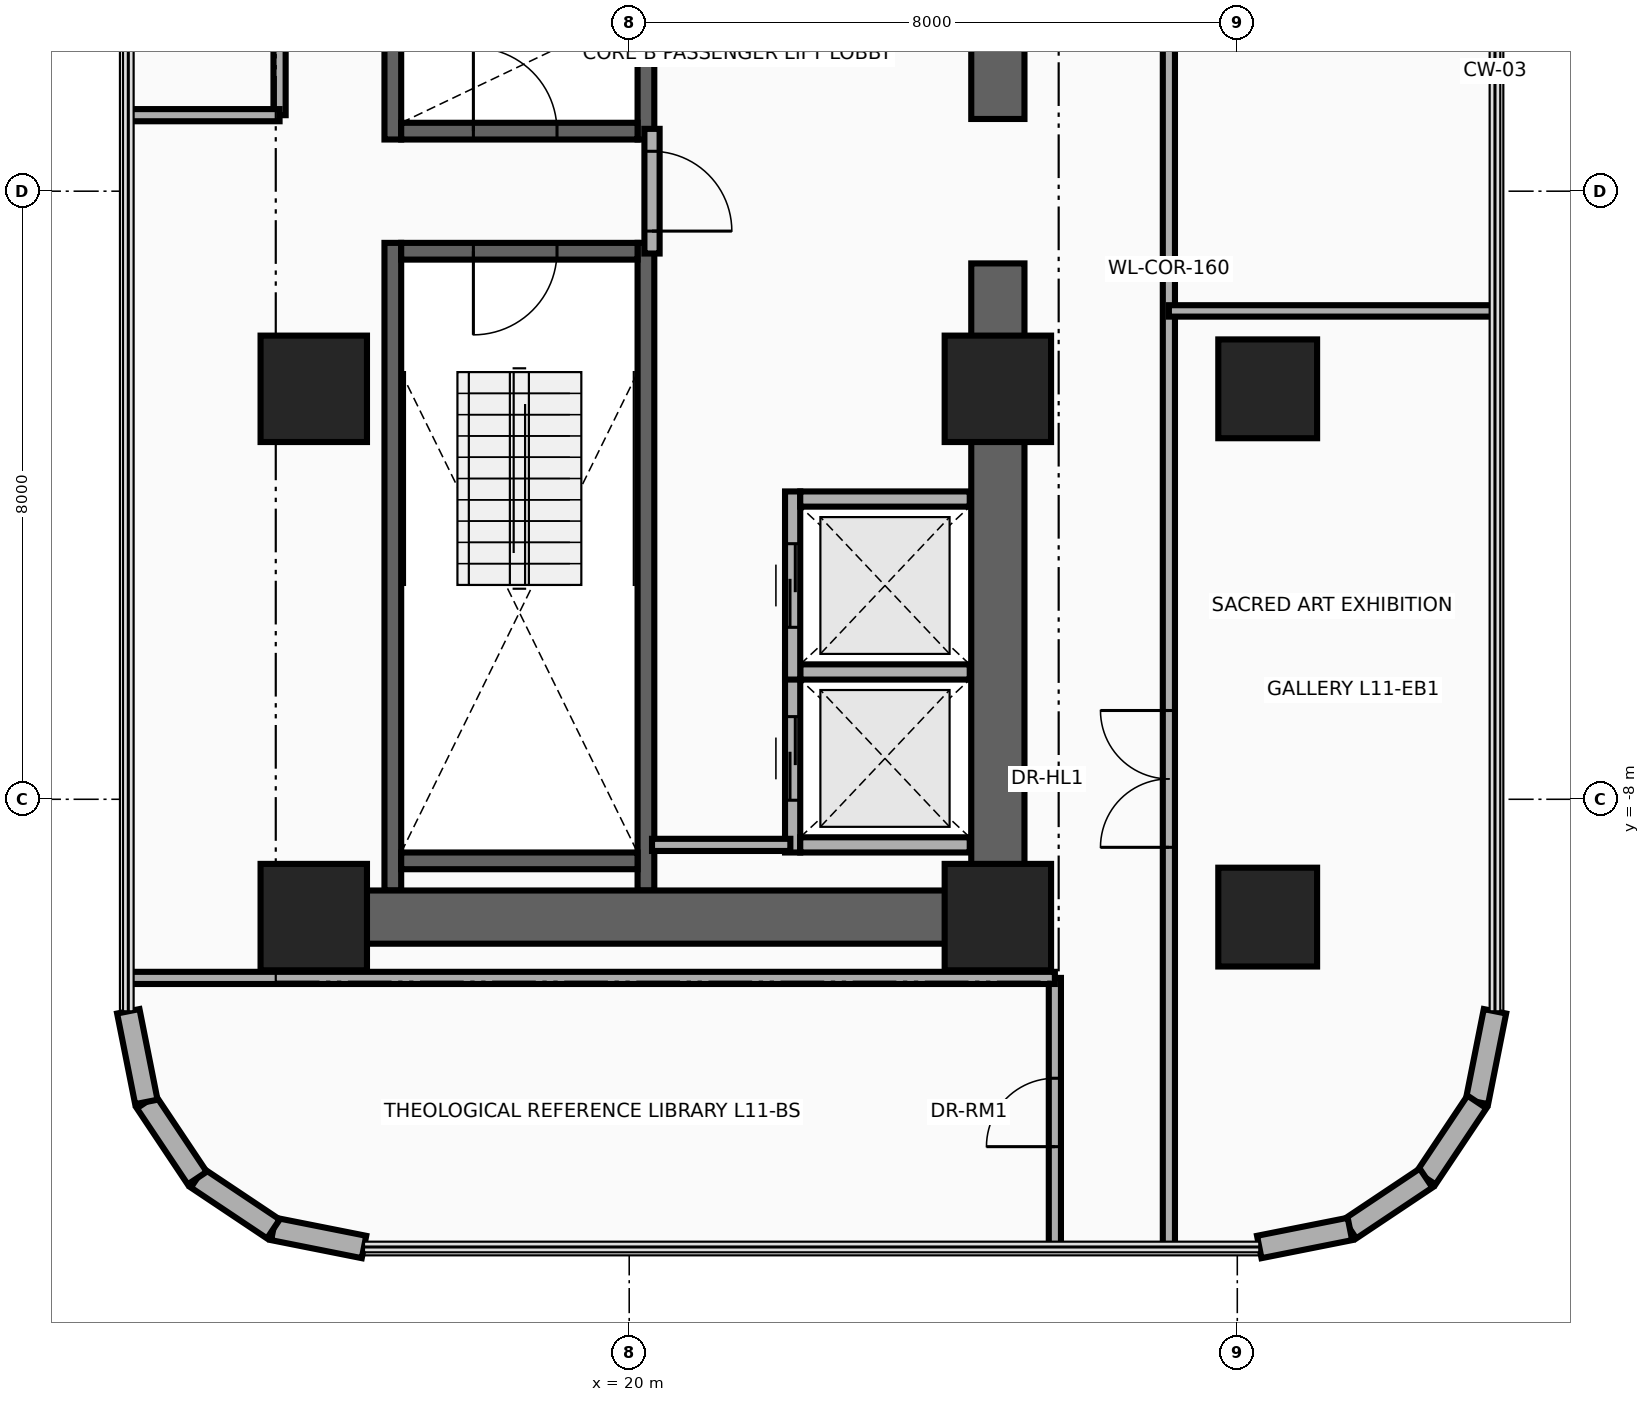
"""IFC4 building model, lengths in metres.
Left out: names, types, materials, properties, quantities, classifications, styles, units other than length and angle.
Written with IfcOpenShell. Run it as: python <this file> out.ifc"""

import sys

from ifc_helpers import new_model, si_unit, direction, frame, frame_2d, origin, origin_2d, place, context, subcontext, project, spatial, rectangle, circle, extrude, source, transform, mapped, element, fill, save


model = new_model("IFC4")
c1 = context("Model", 3, precision=1e-05, world=origin(), true_north=direction((0.0, 1.0)))
c2 = subcontext(c1, "Body", "Model", "MODEL_VIEW")
j1 = project(units=[si_unit("LENGTHUNIT", "METRE"), si_unit("PLANEANGLEUNIT", "RADIAN")], contexts=[c1])
p1 = place(None, origin())
s1 = spatial("IfcSite", under=j1, at=p1, CompositionType="ELEMENT")
p2 = place(p1, origin())
s2 = spatial("IfcBuilding", under=s1, at=p2, CompositionType="ELEMENT")
p3 = place(p2, frame((0.0, 0.0, 48.2)))
s3 = spatial("IfcBuildingStorey", under=s2, at=p3, CompositionType="ELEMENT", Elevation=48.2)
for number, where, z_axis, x_axis in (
    (1, (16.89, 0.68, 0.0), (0.0, 0.0, 1.0), (0.0, 1.0, 0.0)),
    (2, (20.22, 0.68, 0.0), (0.0, 0.0, 1.0), (0.0, 1.0, 0.0)),
):
    element("IfcWall", number, at=place(p3, frame(where, z_axis=z_axis, x_axis=x_axis)), inside=s3, PredefinedType="SHEAR", context=c2, shape_type="SweptSolid", body=[
        extrude(rectangle(XDim=8.52, YDim=0.22, at=frame_2d((4.26, 0.0))), origin(), (0.0, 0.0, 1.0), 3.46),
    ])
p4 = place(p3, frame((17.0, 0.79, 0.0), z_axis=(0.0, 0.0, 1.0), x_axis=(1.0, 0.0, 0.0)))
e3 = element("IfcWall", 3, at=p4, inside=s3, PredefinedType="SHEAR", context=c2, shape_type="SweptSolid", body=[
    extrude(rectangle(XDim=3.11, YDim=0.22, at=frame_2d((1.555, 0.0))), origin(), (0.0, 0.0, 1.0), 3.46),
])
p5 = place(p4, frame((0.95, 0.0, 0.0)))
e4 = element("IfcOpeningElement", 4, at=p5, cuts=e3, PredefinedType="OPENING", context=c2, shape_type="SweptSolid", body=[
    extrude(rectangle(XDim=1.1, YDim=2.15, at=frame_2d((0.55, 1.075))), frame((0.0, 0.125, 0.0), z_axis=(0.0, -1.0, 0.0), x_axis=(1.0, 0.0, 0.0)), (0.0, 0.0, 1.0), 0.25),
])
for number, where, z_axis, x_axis in (
    (5, (16.89, -9.2, 0.0), (0.0, 0.0, 1.0), (0.0, 1.0, 0.0)),
    (6, (20.22, -9.2, 0.0), (0.0, 0.0, 1.0), (0.0, 1.0, 0.0)),
):
    element("IfcWall", number, at=place(p3, frame(where, z_axis=z_axis, x_axis=x_axis)), inside=s3, PredefinedType="SHEAR", context=c2, shape_type="SweptSolid", body=[
        extrude(rectangle(XDim=8.52, YDim=0.22, at=frame_2d((4.26, 0.0))), origin(), (0.0, 0.0, 1.0), 3.46),
    ])
p6 = place(p3, frame((17.0, -8.81, 0.0), z_axis=(0.0, 0.0, 1.0), x_axis=(1.0, 0.0, 0.0)))
e7 = element("IfcWall", 7, at=p6, inside=s3, PredefinedType="SHEAR", context=c2, shape_type="SweptSolid", body=[
    extrude(rectangle(XDim=3.11, YDim=0.22, at=frame_2d((1.555, 0.0))), origin(), (0.0, 0.0, 1.0), 3.46),
])
p7 = place(p3, frame((17.0, -0.79, 0.0), z_axis=(0.0, 0.0, 1.0), x_axis=(1.0, 0.0, 0.0)))
e8 = element("IfcWall", 8, at=p7, inside=s3, PredefinedType="SHEAR", context=c2, shape_type="SweptSolid", body=[
    extrude(rectangle(XDim=3.11, YDim=0.22, at=frame_2d((1.555, 0.0))), origin(), (0.0, 0.0, 1.0), 3.46),
])
p8 = place(p7, frame((0.95, 0.0, 0.0)))
e9 = element("IfcOpeningElement", 9, at=p8, cuts=e8, PredefinedType="OPENING", context=c2, shape_type="SweptSolid", body=[
    extrude(rectangle(XDim=1.1, YDim=2.15, at=frame_2d((0.55, 1.075))), frame((0.0, 0.125, 0.0), z_axis=(0.0, -1.0, 0.0), x_axis=(1.0, 0.0, 0.0)), (0.0, 0.0, 1.0), 0.25),
])
for number, where, z_axis, x_axis in (
    (10, (24.85, -9.9, 0.0), (0.0, 0.0, 1.0), (0.0, 1.0, 0.0)),
    (11, (24.85, 0.95, 0.0), (0.0, 0.0, 1.0), (0.0, 1.0, 0.0)),
):
    element("IfcWall", number, at=place(p3, frame(where, z_axis=z_axis, x_axis=x_axis)), inside=s3, PredefinedType="SHEAR", context=c2, shape_type="SweptSolid", body=[
        extrude(rectangle(XDim=8.95, YDim=0.7, at=frame_2d((4.475, 0.0))), origin(), (0.0, 0.0, 1.0), 3.46),
    ])
p9 = place(p3, frame((15.85, -9.55, 0.0), z_axis=(0.0, 0.0, 1.0), x_axis=(1.0, 0.0, 0.0)))
e12 = element("IfcWall", 12, at=p9, inside=s3, PredefinedType="SHEAR", context=c2, shape_type="SweptSolid", body=[
    extrude(rectangle(XDim=9.0, YDim=0.7, at=frame_2d((4.5, 0.0))), origin(), (0.0, 0.0, 1.0), 3.46),
])
m1 = source(origin(), c2, "Body", "SweptSolid", [
    extrude(rectangle(XDim=1.4, YDim=1.4, at=origin_2d()), origin(), (0.0, 0.0, 1.0), 3.7),
])
for number, where, z_axis, x_axis in (
    (13, (15.85, -9.55, 0.0), (0.0, 0.0, 1.0), (1.0, 0.0, 0.0)),
    (14, (24.85, -9.55, 0.0), (0.0, 0.0, 1.0), (1.0, 0.0, 0.0)),
):
    element("IfcColumn", number, at=place(p3, frame(where, z_axis=z_axis, x_axis=x_axis)), inside=s3, PredefinedType="COLUMN", context=c2, shape_type="MappedRepresentation", body=[
        mapped(m1, transform((0.0, 0.0, 0.0), x_axis=(1.0, 0.0, 0.0), y_axis=(0.0, 1.0, 0.0), z_axis=(0.0, 0.0, 1.0), scale=1.0)),
    ])
m2 = source(origin(), c2, "Body", "SweptSolid", [
    extrude(circle(Radius=0.65, at=origin_2d()), origin(), (0.0, 0.0, 1.0), 3.7),
])
p10 = place(p3, frame((28.4, -9.55, 0.0), z_axis=(0.0, 0.0, 1.0), x_axis=(1.0, 0.0, 0.0)))
e15 = element("IfcColumn", 15, at=p10, inside=s3, PredefinedType="COLUMN", context=c2, shape_type="MappedRepresentation", body=[
    mapped(m2, transform((0.0, 0.0, 0.0), x_axis=(1.0, 0.0, 0.0), y_axis=(0.0, 1.0, 0.0), z_axis=(0.0, 0.0, 1.0), scale=1.0)),
])
for number, where, z_axis, x_axis in (
    (16, (15.85, -2.6, 0.0), (0.0, 0.0, 1.0), (1.0, 0.0, 0.0)),
    (17, (24.85, -2.6, 0.0), (0.0, 0.0, 1.0), (1.0, 0.0, 0.0)),
):
    element("IfcColumn", number, at=place(p3, frame(where, z_axis=z_axis, x_axis=x_axis)), inside=s3, PredefinedType="COLUMN", context=c2, shape_type="MappedRepresentation", body=[
        mapped(m1, transform((0.0, 0.0, 0.0), x_axis=(1.0, 0.0, 0.0), y_axis=(0.0, 1.0, 0.0), z_axis=(0.0, 0.0, 1.0), scale=1.0)),
    ])
p11 = place(p3, frame((28.4, -2.6, 0.0), z_axis=(0.0, 0.0, 1.0), x_axis=(1.0, 0.0, 0.0)))
e18 = element("IfcColumn", 18, at=p11, inside=s3, PredefinedType="COLUMN", context=c2, shape_type="MappedRepresentation", body=[
    mapped(m2, transform((0.0, 0.0, 0.0), x_axis=(1.0, 0.0, 0.0), y_axis=(0.0, 1.0, 0.0), z_axis=(0.0, 0.0, 1.0), scale=1.0)),
])
p12 = place(p3, frame((31.39, -10.789, 0.0), z_axis=(0.0, 0.0, 1.0), x_axis=(-0.194996050505, -0.980804027463, 0.0)))
e19 = element("IfcWall", 19, at=p12, inside=s3, PredefinedType="SOLIDWALL", context=c2, shape_type="SweptSolid", body=[
    extrude(rectangle(XDim=1.216, YDim=0.3, at=frame_2d((0.608, 0.0))), origin(), (0.0, 0.0, 1.0), 3.46),
])
for number, where, z_axis, x_axis in (
    (20, (31.153, -11.982, 0.0), (0.0, 0.0, 1.0), (-0.556, -0.831, 0.0)),
    (21, (30.483, -12.983, 0.0), (0.0, 0.0, 1.0), (-0.831, -0.556, 0.0)),
):
    element("IfcWall", number, at=place(p3, frame(where, z_axis=z_axis, x_axis=x_axis)), inside=s3, PredefinedType="SOLIDWALL", context=c2, shape_type="SweptSolid", body=[
        extrude(rectangle(XDim=1.205, YDim=0.3, at=frame_2d((0.603, 0.0))), origin(), (0.0, 0.0, 1.0), 3.46),
    ])
for number, where, z_axis, x_axis in (
    (22, (29.482, -13.653, 0.0), (0.0, 0.0, 1.0), (-0.981, -0.195, 0.0)),
    (23, (16.511, -13.89, 0.0), (0.0, 0.0, 1.0), (-0.981, 0.195, 0.0)),
):
    element("IfcWall", number, at=place(p3, frame(where, z_axis=z_axis, x_axis=x_axis)), inside=s3, PredefinedType="SOLIDWALL", context=c2, shape_type="SweptSolid", body=[
        extrude(rectangle(XDim=1.216, YDim=0.3, at=frame_2d((0.608, 0.0))), origin(), (0.0, 0.0, 1.0), 3.46),
    ])
for number, where, z_axis, x_axis in (
    (24, (15.318, -13.653, 0.0), (0.0, 0.0, 1.0), (-0.831, 0.556, 0.0)),
    (25, (14.317, -12.983, 0.0), (0.0, 0.0, 1.0), (-0.556, 0.831, 0.0)),
):
    element("IfcWall", number, at=place(p3, frame(where, z_axis=z_axis, x_axis=x_axis)), inside=s3, PredefinedType="SOLIDWALL", context=c2, shape_type="SweptSolid", body=[
        extrude(rectangle(XDim=1.205, YDim=0.3, at=frame_2d((0.603, 0.0))), origin(), (0.0, 0.0, 1.0), 3.46),
    ])
p13 = place(p3, frame((13.647, -11.982, 0.0), z_axis=(0.0, 0.0, 1.0), x_axis=(-0.195189223115, 0.980765602568, 0.0)))
e26 = element("IfcWall", 26, at=p13, inside=s3, PredefinedType="SOLIDWALL", context=c2, shape_type="SweptSolid", body=[
    extrude(rectangle(XDim=1.216, YDim=0.3, at=frame_2d((0.608, 0.0))), origin(), (0.0, 0.0, 1.0), 3.46),
])
p14 = place(p3, frame((22.15, -8.7, 0.0), z_axis=(0.0, 0.0, 1.0), x_axis=(0.0, 1.0, 0.0)))
e27 = element("IfcWall", 27, at=p14, inside=s3, PredefinedType="MOVABLE", context=c2, shape_type="SweptSolid", body=[
    extrude(rectangle(XDim=2.475, YDim=0.2, at=frame_2d((1.237, 0.0))), origin(), (0.0, 0.0, 1.0), 3.46),
])
p15 = place(p14, frame((0.688, 0.0, 0.0)))
e28 = element("IfcOpeningElement", 28, at=p15, cuts=e27, PredefinedType="OPENING", context=c2, shape_type="SweptSolid", body=[
    extrude(rectangle(XDim=1.1, YDim=2.1, at=frame_2d((0.55, 1.05))), frame((0.0, 0.115, 0.0), z_axis=(0.0, -1.0, 0.0), x_axis=(1.0, 0.0, 0.0)), (0.0, 0.0, 1.0), 0.23),
])
for number, where, z_axis, x_axis in (
    (29, (22.25, -8.6, 0.0), (0.0, 0.0, 1.0), (1.0, 0.0, 0.0)),
    (30, (22.25, -6.325, 0.0), (0.0, 0.0, 1.0), (1.0, 0.0, 0.0)),
):
    element("IfcWall", number, at=place(p3, frame(where, z_axis=z_axis, x_axis=x_axis)), inside=s3, PredefinedType="MOVABLE", context=c2, shape_type="SweptSolid", body=[
        extrude(rectangle(XDim=2.23, YDim=0.2, at=frame_2d((1.115, 0.0))), origin(), (0.0, 0.0, 1.0), 3.46),
    ])
p16 = place(p3, frame((22.15, -6.425, 0.0), z_axis=(0.0, 0.0, 1.0), x_axis=(0.0, 1.0, 0.0)))
e31 = element("IfcWall", 31, at=p16, inside=s3, PredefinedType="MOVABLE", context=c2, shape_type="SweptSolid", body=[
    extrude(rectangle(XDim=2.475, YDim=0.2, at=frame_2d((1.238, 0.0))), origin(), (0.0, 0.0, 1.0), 3.46),
])
p17 = place(p16, frame((0.688, 0.0, 0.0)))
e32 = element("IfcOpeningElement", 32, at=p17, cuts=e31, PredefinedType="OPENING", context=c2, shape_type="SweptSolid", body=[
    extrude(rectangle(XDim=1.1, YDim=2.1, at=frame_2d((0.55, 1.05))), frame((0.0, 0.115, 0.0), z_axis=(0.0, -1.0, 0.0), x_axis=(1.0, 0.0, 0.0)), (0.0, 0.0, 1.0), 0.23),
])
p18 = place(p3, frame((22.25, -4.05, 0.0), z_axis=(0.0, 0.0, 1.0), x_axis=(1.0, 0.0, 0.0)))
e33 = element("IfcWall", 33, at=p18, inside=s3, PredefinedType="MOVABLE", context=c2, shape_type="SweptSolid", body=[
    extrude(rectangle(XDim=2.23, YDim=0.2, at=frame_2d((1.115, 0.0))), origin(), (0.0, 0.0, 1.0), 3.46),
])
p19 = place(p3, frame((20.3, -0.82, 0.0), z_axis=(0.0, 0.0, 1.0), x_axis=(0.0, 1.0, 0.0)))
e34 = element("IfcWall", 34, at=p19, inside=s3, PredefinedType="PARTITIONING", context=c2, shape_type="SweptSolid", body=[
    extrude(rectangle(XDim=1.64, YDim=0.2, at=frame_2d((0.82, 0.0))), origin(), (0.0, 0.0, 1.0), 3.46),
])
p20 = place(p19, frame((0.295, 0.0, 0.0)))
e35 = element("IfcOpeningElement", 35, at=p20, cuts=e34, PredefinedType="OPENING", context=c2, shape_type="SweptSolid", body=[
    extrude(rectangle(XDim=1.05, YDim=2.15, at=frame_2d((0.525, 1.075))), frame((0.0, 0.115, 0.0), z_axis=(0.0, -1.0, 0.0), x_axis=(1.0, 0.0, 0.0)), (0.0, 0.0, 1.0), 0.23),
])
p21 = place(p3, frame((20.3, -8.6, 0.0), z_axis=(0.0, 0.0, 1.0), x_axis=(1.0, 0.0, 0.0)))
e36 = element("IfcWall", 36, at=p21, inside=s3, PredefinedType="PARTITIONING", context=c2, shape_type="SweptSolid", body=[
    extrude(rectangle(XDim=1.82, YDim=0.16, at=frame_2d((0.91, 0.0))), origin(), (0.0, 0.0, 1.0), 3.46),
])
p22 = place(p3, frame((25.6, -13.89, 0.0), z_axis=(0.0, 0.0, 1.0), x_axis=(0.0, 1.0, 0.0)))
e37 = element("IfcWall", 37, at=p22, inside=s3, PredefinedType="PARTITIONING", context=c2, shape_type="SweptSolid", body=[
    extrude(rectangle(XDim=3.54, YDim=0.16, at=frame_2d((1.77, 0.0))), origin(), (0.0, 0.0, 1.0), 3.46),
])
p23 = place(p22, frame((1.32, 0.0, 0.0)))
e38 = element("IfcOpeningElement", 38, at=p23, cuts=e37, PredefinedType="OPENING", context=c2, shape_type="SweptSolid", body=[
    extrude(rectangle(XDim=0.9, YDim=2.1, at=frame_2d((0.45, 1.05))), frame((0.0, 0.095, 0.0), z_axis=(0.0, -1.0, 0.0), x_axis=(1.0, 0.0, 0.0)), (0.0, 0.0, 1.0), 0.19),
])
p24 = place(p3, frame((13.41, -10.35, 0.0), z_axis=(0.0, 0.0, 1.0), x_axis=(1.0, 0.0, 0.0)))
e39 = element("IfcWall", 39, at=p24, inside=s3, PredefinedType="PARTITIONING", context=c2, shape_type="SweptSolid", body=[
    extrude(rectangle(XDim=12.19, YDim=0.16, at=frame_2d((6.095, 0.0))), origin(), (0.0, 0.0, 1.0), 3.46),
])
p25 = place(p3, frame((27.1, -13.89, 0.0), z_axis=(0.0, 0.0, 1.0), x_axis=(0.0, 1.0, 0.0)))
e40 = element("IfcWall", 40, at=p25, inside=s3, PredefinedType="PARTITIONING", context=c2, shape_type="SweptSolid", body=[
    extrude(rectangle(XDim=25.74, YDim=0.16, at=frame_2d((12.87, 0.0))), origin(), (0.0, 0.0, 1.0), 2.583),
])
p26 = place(p25, frame((5.258, 0.0, 0.0)))
e41 = element("IfcOpeningElement", 41, at=p26, cuts=e40, PredefinedType="OPENING", context=c2, shape_type="SweptSolid", body=[
    extrude(rectangle(XDim=1.8, YDim=2.15, at=frame_2d((0.9, 1.075))), frame((0.0, 0.095, 0.0), z_axis=(0.0, -1.0, 0.0), x_axis=(1.0, 0.0, 0.0)), (0.0, 0.0, 1.0), 0.19),
])
p27 = place(p25, frame((18.128, 0.0, 0.0)))
e42 = element("IfcOpeningElement", 42, at=p27, cuts=e40, PredefinedType="OPENING", context=c2, shape_type="SweptSolid", body=[
    extrude(rectangle(XDim=1.8, YDim=2.15, at=frame_2d((0.9, 1.075))), frame((0.0, 0.095, 0.0), z_axis=(0.0, -1.0, 0.0), x_axis=(1.0, 0.0, 0.0)), (0.0, 0.0, 1.0), 0.19),
])
p28 = place(p3, frame((27.1, -1.575, 0.0), z_axis=(0.0, 0.0, 1.0), x_axis=(1.0, 0.0, 0.0)))
e43 = element("IfcWall", 43, at=p28, inside=s3, PredefinedType="PARTITIONING", context=c2, shape_type="SweptSolid", body=[
    extrude(rectangle(XDim=4.29, YDim=0.15, at=frame_2d((2.145, 0.0))), origin(), (0.0, 0.0, 1.0), 2.896),
])
p29 = place(p3, frame((15.4, 1.0, 0.0), z_axis=(0.0, 0.0, 1.0), x_axis=(0.0, 1.0, 0.0)))
e44 = element("IfcWall", 44, at=p29, inside=s3, PredefinedType="PARTITIONING", context=c2, shape_type="SweptSolid", body=[
    extrude(rectangle(XDim=9.35, YDim=0.16, at=frame_2d((4.675, 0.0))), origin(), (0.0, 0.0, 1.0), 2.245),
])
p30 = place(p3, frame((13.41, 1.0, 0.0), z_axis=(0.0, 0.0, 1.0), x_axis=(1.0, 0.0, 0.0)))
e45 = element("IfcWall", 45, at=p30, inside=s3, PredefinedType="PARTITIONING", context=c2, shape_type="SweptSolid", body=[
    extrude(rectangle(XDim=1.99, YDim=0.16, at=frame_2d((0.995, 0.0))), origin(), (0.0, 0.0, 1.0), 2.245),
])
p31 = place(p15, origin())
e46 = element("IfcDoor", 46, at=p31, inside=s3, OperationType="DOUBLE_DOOR_SLIDING", PredefinedType="DOOR", context=c2, shape_type="SweptSolid", body=[
    extrude(rectangle(XDim=1.1, YDim=2.1, at=frame_2d((0.55, 1.05))), frame((0.0, 0.025, 0.0), z_axis=(0.0, -1.0, 0.0), x_axis=(1.0, 0.0, 0.0)), (0.0, 0.0, 1.0), 0.05),
])
fill(e28, e46)
p32 = place(p17, origin())
e47 = element("IfcDoor", 47, at=p32, inside=s3, OperationType="DOUBLE_DOOR_SLIDING", PredefinedType="DOOR", context=c2, shape_type="SweptSolid", body=[
    extrude(rectangle(XDim=1.1, YDim=2.1, at=frame_2d((0.55, 1.05))), frame((0.0, 0.025, 0.0), z_axis=(0.0, -1.0, 0.0), x_axis=(1.0, 0.0, 0.0)), (0.0, 0.0, 1.0), 0.05),
])
fill(e32, e47)
p33 = place(p20, frame((1.05, 0.0, 0.0), z_axis=(0.0, 0.0, 1.0), x_axis=(-1.0, 0.0, 0.0)))
e48 = element("IfcDoor", 48, at=p33, inside=s3, OperationType="SINGLE_SWING_LEFT", PredefinedType="DOOR", context=c2, shape_type="SweptSolid", body=[
    extrude(rectangle(XDim=1.05, YDim=2.15, at=frame_2d((0.525, 1.075))), frame((0.0, 0.025, 0.0), z_axis=(0.0, -1.0, 0.0), x_axis=(1.0, 0.0, 0.0)), (0.0, 0.0, 1.0), 0.05),
])
fill(e35, e48)
p34 = place(p5, origin())
e49 = element("IfcDoor", 49, at=p34, inside=s3, OperationType="SINGLE_SWING_RIGHT", PredefinedType="DOOR", context=c2, shape_type="SweptSolid", body=[
    extrude(rectangle(XDim=1.1, YDim=2.15, at=frame_2d((0.55, 1.075))), frame((0.0, 0.025, 0.0), z_axis=(0.0, -1.0, 0.0), x_axis=(1.0, 0.0, 0.0)), (0.0, 0.0, 1.0), 0.05),
])
fill(e4, e49)
p35 = place(p8, frame((1.1, 0.0, 0.0), z_axis=(0.0, 0.0, 1.0), x_axis=(-1.0, 0.0, 0.0)))
e50 = element("IfcDoor", 50, at=p35, inside=s3, OperationType="SINGLE_SWING_LEFT", PredefinedType="DOOR", context=c2, shape_type="SweptSolid", body=[
    extrude(rectangle(XDim=1.1, YDim=2.15, at=frame_2d((0.55, 1.075))), frame((0.0, 0.025, 0.0), z_axis=(0.0, -1.0, 0.0), x_axis=(1.0, 0.0, 0.0)), (0.0, 0.0, 1.0), 0.05),
])
fill(e9, e50)
p36 = place(p23, origin())
e51 = element("IfcDoor", 51, at=p36, inside=s3, OperationType="SINGLE_SWING_RIGHT", PredefinedType="DOOR", context=c2, shape_type="SweptSolid", body=[
    extrude(rectangle(XDim=0.9, YDim=2.1, at=frame_2d((0.45, 1.05))), frame((0.0, 0.025, 0.0), z_axis=(0.0, -1.0, 0.0), x_axis=(1.0, 0.0, 0.0)), (0.0, 0.0, 1.0), 0.05),
])
fill(e38, e51)
p37 = place(p26, origin())
e52 = element("IfcDoor", 52, at=p37, inside=s3, OperationType="DOUBLE_DOOR_SINGLE_SWING", PredefinedType="DOOR", context=c2, shape_type="SweptSolid", body=[
    extrude(rectangle(XDim=1.8, YDim=2.15, at=frame_2d((0.9, 1.075))), frame((0.0, 0.025, 0.0), z_axis=(0.0, -1.0, 0.0), x_axis=(1.0, 0.0, 0.0)), (0.0, 0.0, 1.0), 0.05),
])
fill(e41, e52)
save(model, sys.argv[1])
